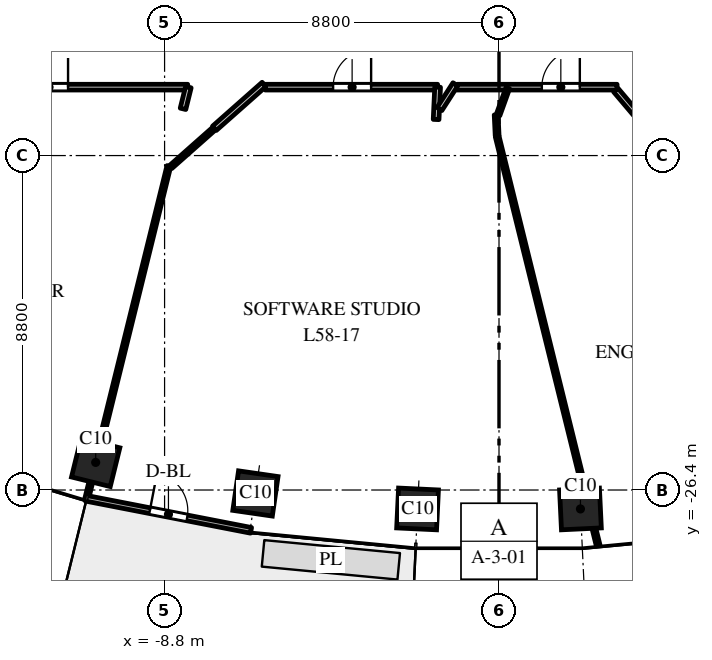
"""IFC4 building model, lengths in metres.
Left out: names, types, materials, properties, quantities, classifications, styles, units other than length and angle.
Written with IfcOpenShell. Run it as: python <this file> out.ifc"""

import sys

from ifc_helpers import new_model, si_unit, direction, frame, frame_2d, origin, origin_2d, place, context, subcontext, project, spatial, rectangle, extrude, element, fill, save


model = new_model("IFC4")
c1 = context("Model", 3, precision=1e-05, world=origin(), true_north=direction((0.0, 1.0)))
c2 = subcontext(c1, "Body", "Model", "MODEL_VIEW")
j1 = project(units=[si_unit("LENGTHUNIT", "METRE"), si_unit("PLANEANGLEUNIT", "RADIAN")], contexts=[c1])
p1 = place(None, origin())
s1 = spatial("IfcSite", under=j1, at=p1, CompositionType="ELEMENT")
p2 = place(p1, origin())
s2 = spatial("IfcBuilding", under=s1, at=p2, CompositionType="ELEMENT")
p3 = place(p2, frame((0.0, 0.0, 273.5)))
s3 = spatial("IfcBuildingStorey", under=s2, at=p3, CompositionType="ELEMENT", Elevation=273.5)
for number, where, z_axis, x_axis in (
    (1, (-10.613, -25.674, 0.0), (0.0, 0.0, 1.0), (0.971, -0.24, 0.0)),
    (2, (-6.409, -26.491, 0.0), (0.0, 0.0, 1.0), (0.99, -0.143, 0.0)),
    (3, (-2.143, -26.898, 0.0), (0.0, 0.0, 1.0), (0.999, -0.048, 0.0)),
    (4, (2.143, -26.898, 0.0), (0.0, 0.0, 1.0), (0.999, 0.048, 0.0)),
):
    element("IfcColumn", number, at=place(p3, frame(where, z_axis=z_axis, x_axis=x_axis)), inside=s3, PredefinedType="COLUMN", context=c2, shape_type="SweptSolid", body=[
        extrude(rectangle(XDim=1.05, YDim=1.05, at=origin_2d()), origin(), (0.0, 0.0, 1.0), 4.0),
    ])
p4 = place(p3, frame((-10.871, -26.617, 0.0), z_axis=(0.0, 0.0, 1.0), x_axis=(0.981631174778, -0.190788460615, 0.0)))
e5 = element("IfcWall", 5, at=p4, inside=s3, PredefinedType="STANDARD", context=c2, shape_type="SweptSolid", body=[
    extrude(rectangle(XDim=4.426, YDim=0.15, at=frame_2d((2.213, 0.0))), origin(), (0.0, 0.0, 1.0), 3.7),
])
p5 = place(p4, frame((1.713, 0.0, 0.0)))
e6 = element("IfcOpeningElement", 6, at=p5, cuts=e5, PredefinedType="OPENING", context=c2, shape_type="SweptSolid", body=[
    extrude(rectangle(XDim=1.0, YDim=2.4, at=frame_2d((0.5, 1.2))), frame((0.0, 0.085, 0.0), z_axis=(0.0, -1.0, 0.0), x_axis=(1.0, 0.0, 0.0)), (0.0, 0.0, 1.0), 0.17),
])
p6 = place(p3, frame((-28.0, -15.8, 0.0), z_axis=(0.0, 0.0, 1.0), x_axis=(1.0, 0.0, 0.0)))
e7 = element("IfcWall", 7, at=p6, inside=s3, PredefinedType="PARTITIONING", context=c2, shape_type="SweptSolid", body=[
    extrude(rectangle(XDim=19.809, YDim=0.15, at=frame_2d((9.905, 0.0))), origin(), (0.0, 0.0, 1.0), 2.75),
])
p7 = place(p6, frame((7.878, 0.0, 0.0)))
e8 = element("IfcOpeningElement", 8, at=p7, cuts=e7, PredefinedType="OPENING", context=c2, shape_type="SweptSolid", body=[
    extrude(rectangle(XDim=1.0, YDim=2.1, at=frame_2d((0.5, 1.05))), frame((0.0, 0.085, 0.0), z_axis=(0.0, -1.0, 0.0), x_axis=(1.0, 0.0, 0.0)), (0.0, 0.0, 1.0), 0.17),
])
p8 = place(p6, frame((15.66, 0.0, 0.0)))
e9 = element("IfcOpeningElement", 9, at=p8, cuts=e7, PredefinedType="OPENING", context=c2, shape_type="SweptSolid", body=[
    extrude(rectangle(XDim=1.0, YDim=2.1, at=frame_2d((0.5, 1.05))), frame((0.0, 0.085, 0.0), z_axis=(0.0, -1.0, 0.0), x_axis=(1.0, 0.0, 0.0)), (0.0, 0.0, 1.0), 0.17),
])
p9 = place(p3, frame((-10.853, -26.646, 0.0), z_axis=(0.0, 0.0, 1.0), x_axis=(0.239774810524, 0.970828532872, 0.0)))
e10 = element("IfcWall", 10, at=p9, inside=s3, PredefinedType="PARTITIONING", context=c2, shape_type="SweptSolid", body=[
    extrude(rectangle(XDim=9.033, YDim=0.1, at=frame_2d((4.517, 0.0))), origin(), (0.0, 0.0, 1.0), 2.85),
])
p10 = place(p3, frame((-8.642, -17.903, 0.0), z_axis=(0.0, 0.0, 1.0), x_axis=(0.748963294947, 0.662611487089, 0.0)))
e11 = element("IfcWall", 11, at=p10, inside=s3, PredefinedType="PARTITIONING", context=c2, shape_type="SweptSolid", body=[
    extrude(rectangle(XDim=1.541, YDim=0.1, at=frame_2d((0.771, 0.0))), origin(), (0.0, 0.0, 1.0), 3.7),
])
p11 = place(p3, frame((-8.315, -16.37, 0.0), z_axis=(0.0, 0.0, 1.0), x_axis=(0.239893428325, 0.97079922901, 0.0)))
e12 = element("IfcWall", 12, at=p11, inside=s3, PredefinedType="PARTITIONING", context=c2, shape_type="SweptSolid", body=[
    extrude(rectangle(XDim=0.587, YDim=0.15, at=frame_2d((0.293, 0.0))), origin(), (0.0, 0.0, 1.0), 3.7),
])
p12 = place(p3, frame((-7.488, -16.882, 0.0), z_axis=(0.0, 0.0, 1.0), x_axis=(0.749084830903, 0.662474087124, 0.0)))
e13 = element("IfcWall", 13, at=p12, inside=s3, PredefinedType="PARTITIONING", context=c2, shape_type="SweptSolid", body=[
    extrude(rectangle(XDim=1.742, YDim=0.15, at=frame_2d((0.871, 0.0))), origin(), (0.0, 0.0, 1.0), 2.85),
])
p13 = place(p3, frame((-6.152, -15.8, 0.0), z_axis=(0.0, 0.0, 1.0), x_axis=(1.0, 0.0, 0.0)))
e14 = element("IfcWall", 14, at=p13, inside=s3, PredefinedType="PARTITIONING", context=c2, shape_type="SweptSolid", body=[
    extrude(rectangle(XDim=4.537, YDim=0.15, at=frame_2d((2.269, 0.0))), origin(), (0.0, 0.0, 1.0), 3.7),
])
p14 = place(p13, frame((1.787, 0.0, 0.0)))
e15 = element("IfcOpeningElement", 15, at=p14, cuts=e14, PredefinedType="OPENING", context=c2, shape_type="SweptSolid", body=[
    extrude(rectangle(XDim=1.0, YDim=2.1, at=frame_2d((0.5, 1.05))), frame((0.0, 0.085, 0.0), z_axis=(0.0, -1.0, 0.0), x_axis=(1.0, 0.0, 0.0)), (0.0, 0.0, 1.0), 0.17),
])
p15 = place(p3, frame((-1.655, -16.651, 0.0), z_axis=(0.0, 0.0, 1.0), x_axis=(0.047006803258, 0.998894569235, 0.0)))
e16 = element("IfcWall", 16, at=p15, inside=s3, PredefinedType="PARTITIONING", context=c2, shape_type="SweptSolid", body=[
    extrude(rectangle(XDim=0.852, YDim=0.15, at=frame_2d((0.426, 0.0))), origin(), (0.0, 0.0, 1.0), 3.7),
])
p16 = place(p3, frame((-1.567, -16.376, 0.0), z_axis=(0.0, 0.0, 1.0), x_axis=(0.541235735997, 0.840870904527, 0.0)))
e17 = element("IfcWall", 17, at=p16, inside=s3, PredefinedType="PARTITIONING", context=c2, shape_type="SweptSolid", body=[
    extrude(rectangle(XDim=0.774, YDim=0.15, at=frame_2d((0.387, 0.0))), origin(), (0.0, 0.0, 1.0), 2.85),
])
p17 = place(p3, frame((-1.107, -15.8, 0.0), z_axis=(0.0, 0.0, 1.0), x_axis=(1.0, 0.0, 0.0)))
e18 = element("IfcWall", 18, at=p17, inside=s3, PredefinedType="PARTITIONING", context=c2, shape_type="SweptSolid", body=[
    extrude(rectangle(XDim=4.214, YDim=0.15, at=frame_2d((2.107, 0.0))), origin(), (0.0, 0.0, 1.0), 3.7),
])
p18 = place(p17, frame((2.234, 0.0, 0.0)))
e19 = element("IfcOpeningElement", 19, at=p18, cuts=e18, PredefinedType="OPENING", context=c2, shape_type="SweptSolid", body=[
    extrude(rectangle(XDim=1.0, YDim=2.1, at=frame_2d((0.5, 1.05))), frame((0.0, 0.085, 0.0), z_axis=(0.0, -1.0, 0.0), x_axis=(1.0, 0.0, 0.0)), (0.0, 0.0, 1.0), 0.17),
])
p19 = place(p3, frame((-0.075, -16.528, 0.0), z_axis=(0.0, 0.0, 1.0), x_axis=(0.047184463658, -0.998886192912, 0.0)))
e20 = element("IfcWall", 20, at=p19, inside=s3, PredefinedType="PARTITIONING", context=c2, shape_type="SweptSolid", body=[
    extrude(rectangle(XDim=0.549, YDim=0.1, at=frame_2d((0.274, 0.0))), origin(), (0.0, 0.0, 1.0), 3.7),
])
p20 = place(p3, frame((-0.025, -16.535, 0.0), z_axis=(0.0, 0.0, 1.0), x_axis=(0.338627931753, 0.940920359986, 0.0)))
e21 = element("IfcWall", 21, at=p20, inside=s3, PredefinedType="PARTITIONING", context=c2, shape_type="SweptSolid", body=[
    extrude(rectangle(XDim=0.756, YDim=0.1, at=frame_2d((0.378, 0.0))), origin(), (0.0, 0.0, 1.0), 3.7),
])
p21 = place(p3, frame((-0.048, -17.097, 0.0), z_axis=(0.0, 0.0, 1.0), x_axis=(0.23971007337, -0.970844519336, 0.0)))
e22 = element("IfcWall", 22, at=p21, inside=s3, PredefinedType="PARTITIONING", context=c2, shape_type="SweptSolid", body=[
    extrude(rectangle(XDim=11.084, YDim=0.1, at=frame_2d((5.542, 0.0))), origin(), (0.0, 0.0, 1.0), 3.0),
])
p22 = place(p3, frame((3.075, -15.878, 0.0), z_axis=(0.0, 0.0, 1.0), x_axis=(0.646427152644, -0.76297571149, 0.0)))
e23 = element("IfcWall", 23, at=p22, inside=s3, PredefinedType="PARTITIONING", context=c2, shape_type="SweptSolid", body=[
    extrude(rectangle(XDim=1.579, YDim=0.15, at=frame_2d((0.79, 0.0))), origin(), (0.0, 0.0, 1.0), 2.85),
])
p23 = place(p5, origin())
e24 = element("IfcDoor", 24, at=p23, inside=s3, OperationType="SINGLE_SWING_LEFT", PredefinedType="DOOR", context=c2, shape_type="SweptSolid", body=[
    extrude(rectangle(XDim=1.0, YDim=2.4, at=frame_2d((0.5, 1.2))), frame((0.0, 0.025, 0.0), z_axis=(0.0, -1.0, 0.0), x_axis=(1.0, 0.0, 0.0)), (0.0, 0.0, 1.0), 0.05),
])
fill(e6, e24)
p24 = place(p8, origin())
e25 = element("IfcDoor", 25, at=p24, inside=s3, OperationType="SINGLE_SWING_RIGHT", PredefinedType="DOOR", context=c2, shape_type="SweptSolid", body=[
    extrude(rectangle(XDim=1.0, YDim=2.1, at=frame_2d((0.5, 1.05))), frame((0.0, 0.025, 0.0), z_axis=(0.0, -1.0, 0.0), x_axis=(1.0, 0.0, 0.0)), (0.0, 0.0, 1.0), 0.05),
])
fill(e9, e25)
p25 = place(p14, origin())
e26 = element("IfcDoor", 26, at=p25, inside=s3, OperationType="SINGLE_SWING_RIGHT", PredefinedType="DOOR", context=c2, shape_type="SweptSolid", body=[
    extrude(rectangle(XDim=1.0, YDim=2.1, at=frame_2d((0.5, 1.05))), frame((0.0, 0.025, 0.0), z_axis=(0.0, -1.0, 0.0), x_axis=(1.0, 0.0, 0.0)), (0.0, 0.0, 1.0), 0.05),
])
fill(e15, e26)
p26 = place(p18, origin())
e27 = element("IfcDoor", 27, at=p26, inside=s3, OperationType="SINGLE_SWING_RIGHT", PredefinedType="DOOR", context=c2, shape_type="SweptSolid", body=[
    extrude(rectangle(XDim=1.0, YDim=2.1, at=frame_2d((0.5, 1.05))), frame((0.0, 0.025, 0.0), z_axis=(0.0, -1.0, 0.0), x_axis=(1.0, 0.0, 0.0)), (0.0, 0.0, 1.0), 0.05),
])
fill(e19, e27)
save(model, sys.argv[1])
